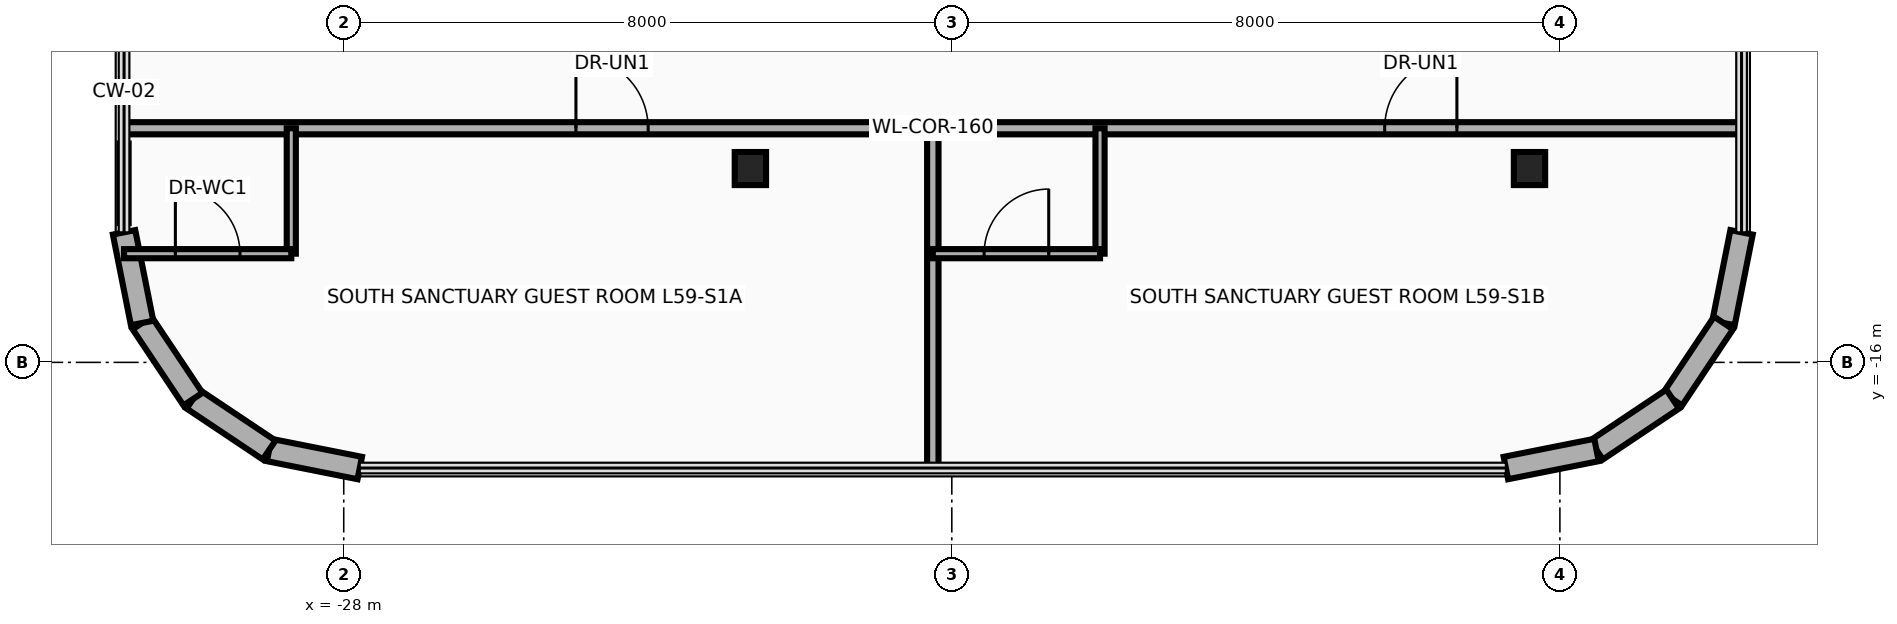
"""IFC4 building model, lengths in metres.
Left out: names, types, materials, properties, quantities, classifications, styles, units other than length and angle.
Written with IfcOpenShell. Run it as: python <this file> out.ifc"""

import sys

from ifc_helpers import new_model, si_unit, direction, frame, frame_2d, origin, origin_2d, place, context, subcontext, project, spatial, rectangle, i_section, extrude, source, transform, mapped, element, fill, save


model = new_model("IFC4")
c1 = context("Model", 3, precision=1e-05, world=origin(), true_north=direction((0.0, 1.0)))
c2 = subcontext(c1, "Body", "Model", "MODEL_VIEW")
j1 = project(units=[si_unit("LENGTHUNIT", "METRE"), si_unit("PLANEANGLEUNIT", "RADIAN")], contexts=[c1])
p1 = place(None, origin())
s1 = spatial("IfcSite", under=j1, at=p1, CompositionType="ELEMENT")
p2 = place(p1, origin())
s2 = spatial("IfcBuilding", under=s1, at=p2, CompositionType="ELEMENT")
p3 = place(p2, frame((0.0, 0.0, 230.0)))
s3 = spatial("IfcBuildingStorey", under=s2, at=p3, CompositionType="ELEMENT", Elevation=230.0)
m1 = source(origin(), c2, "Body", "SweptSolid", [
    extrude(i_section(OverallWidth=0.412, OverallDepth=0.435, WebThickness=0.036, FlangeThickness=0.057, at=origin_2d()), origin(), (0.0, 0.0, 1.0), 3.5),
])
for number, where, z_axis, x_axis in (
    (1, (-22.65, -13.45, 0.0), (0.0, 0.0, 1.0), (1.0, 0.0, 0.0)),
    (2, (-12.4, -13.45, 0.0), (0.0, 0.0, 1.0), (1.0, 0.0, 0.0)),
):
    element("IfcColumn", number, at=place(p3, frame(where, z_axis=z_axis, x_axis=x_axis)), inside=s3, PredefinedType="COLUMN", context=c2, shape_type="MappedRepresentation", body=[
        mapped(m1, transform((0.0, 0.0, 0.0), x_axis=(1.0, 0.0, 0.0), y_axis=(0.0, 1.0, 0.0), z_axis=(0.0, 0.0, 1.0), scale=1.0)),
    ])
p4 = place(p3, frame((-9.61, -14.289, 0.0), z_axis=(0.0, 0.0, 1.0), x_axis=(-0.194996050505, -0.980804027463, 0.0)))
e3 = element("IfcWall", 3, at=p4, inside=s3, PredefinedType="SOLIDWALL", context=c2, shape_type="SweptSolid", body=[
    extrude(rectangle(XDim=1.216, YDim=0.3, at=frame_2d((0.608, 0.0))), origin(), (0.0, 0.0, 1.0), 3.26),
])
for number, where, z_axis, x_axis in (
    (4, (-9.847, -15.482, 0.0), (0.0, 0.0, 1.0), (-0.556, -0.831, 0.0)),
    (5, (-10.517, -16.483, 0.0), (0.0, 0.0, 1.0), (-0.831, -0.556, 0.0)),
):
    element("IfcWall", number, at=place(p3, frame(where, z_axis=z_axis, x_axis=x_axis)), inside=s3, PredefinedType="SOLIDWALL", context=c2, shape_type="SweptSolid", body=[
        extrude(rectangle(XDim=1.205, YDim=0.3, at=frame_2d((0.603, 0.0))), origin(), (0.0, 0.0, 1.0), 3.26),
    ])
for number, where, z_axis, x_axis in (
    (6, (-11.518, -17.153, 0.0), (0.0, 0.0, 1.0), (-0.981, -0.195, 0.0)),
    (7, (-27.789, -17.39, 0.0), (0.0, 0.0, 1.0), (-0.981, 0.195, 0.0)),
):
    element("IfcWall", number, at=place(p3, frame(where, z_axis=z_axis, x_axis=x_axis)), inside=s3, PredefinedType="SOLIDWALL", context=c2, shape_type="SweptSolid", body=[
        extrude(rectangle(XDim=1.216, YDim=0.3, at=frame_2d((0.608, 0.0))), origin(), (0.0, 0.0, 1.0), 3.26),
    ])
for number, where, z_axis, x_axis in (
    (8, (-28.982, -17.153, 0.0), (0.0, 0.0, 1.0), (-0.831, 0.556, 0.0)),
    (9, (-29.983, -16.483, 0.0), (0.0, 0.0, 1.0), (-0.556, 0.831, 0.0)),
):
    element("IfcWall", number, at=place(p3, frame(where, z_axis=z_axis, x_axis=x_axis)), inside=s3, PredefinedType="SOLIDWALL", context=c2, shape_type="SweptSolid", body=[
        extrude(rectangle(XDim=1.205, YDim=0.3, at=frame_2d((0.603, 0.0))), origin(), (0.0, 0.0, 1.0), 3.26),
    ])
p5 = place(p3, frame((-30.653, -15.482, 0.0), z_axis=(0.0, 0.0, 1.0), x_axis=(-0.194996050505, 0.980804027463, 0.0)))
e10 = element("IfcWall", 10, at=p5, inside=s3, PredefinedType="SOLIDWALL", context=c2, shape_type="SweptSolid", body=[
    extrude(rectangle(XDim=1.216, YDim=0.3, at=frame_2d((0.608, 0.0))), origin(), (0.0, 0.0, 1.0), 3.26),
])
p6 = place(p3, frame((-30.89, -12.92, 0.0), z_axis=(0.0, 0.0, 1.0), x_axis=(1.0, 0.0, 0.0)))
e11 = element("IfcWall", 11, at=p6, inside=s3, PredefinedType="PARTITIONING", context=c2, shape_type="SweptSolid", body=[
    extrude(rectangle(XDim=21.28, YDim=0.16, at=frame_2d((10.64, 0.0))), origin(), (0.0, 0.0, 1.0), 2.634),
])
p7 = place(p6, frame((5.945, 0.0, 0.0)))
e12 = element("IfcOpeningElement", 12, at=p7, cuts=e11, PredefinedType="OPENING", context=c2, shape_type="SweptSolid", body=[
    extrude(rectangle(XDim=0.95, YDim=2.15, at=frame_2d((0.475, 1.075))), frame((0.0, 0.095, 0.0), z_axis=(0.0, -1.0, 0.0), x_axis=(1.0, 0.0, 0.0)), (0.0, 0.0, 1.0), 0.19),
])
p8 = place(p6, frame((16.585, 0.0, 0.0)))
e13 = element("IfcOpeningElement", 13, at=p8, cuts=e11, PredefinedType="OPENING", context=c2, shape_type="SweptSolid", body=[
    extrude(rectangle(XDim=0.95, YDim=2.15, at=frame_2d((0.475, 1.075))), frame((0.0, 0.095, 0.0), z_axis=(0.0, -1.0, 0.0), x_axis=(1.0, 0.0, 0.0)), (0.0, 0.0, 1.0), 0.19),
])
p9 = place(p3, frame((-20.25, -17.39, 0.0), z_axis=(0.0, 0.0, 1.0), x_axis=(0.0, 1.0, 0.0)))
e14 = element("IfcWall", 14, at=p9, inside=s3, PredefinedType="PARTITIONING", context=c2, shape_type="SweptSolid", body=[
    extrude(rectangle(XDim=4.47, YDim=0.15, at=frame_2d((2.235, 0.0))), origin(), (0.0, 0.0, 1.0), 2.706),
])
p10 = place(p3, frame((-28.69, -14.57, 0.0), z_axis=(0.0, 0.0, 1.0), x_axis=(0.0, 1.0, 0.0)))
e15 = element("IfcWall", 15, at=p10, inside=s3, PredefinedType="PARTITIONING", context=c2, shape_type="SweptSolid", body=[
    extrude(rectangle(XDim=1.65, YDim=0.12, at=frame_2d((0.825, 0.0))), origin(), (0.0, 0.0, 1.0), 3.26),
])
p11 = place(p3, frame((-30.89, -14.57, 0.0), z_axis=(0.0, 0.0, 1.0), x_axis=(1.0, 0.0, 0.0)))
e16 = element("IfcWall", 16, at=p11, inside=s3, PredefinedType="PARTITIONING", context=c2, shape_type="SweptSolid", body=[
    extrude(rectangle(XDim=2.2, YDim=0.12, at=frame_2d((1.1, 0.0))), origin(), (0.0, 0.0, 1.0), 3.26),
])
p12 = place(p11, frame((0.675, 0.0, 0.0)))
e17 = element("IfcOpeningElement", 17, at=p12, cuts=e16, PredefinedType="OPENING", context=c2, shape_type="SweptSolid", body=[
    extrude(rectangle(XDim=0.85, YDim=2.1, at=frame_2d((0.425, 1.05))), frame((0.0, 0.075, 0.0), z_axis=(0.0, -1.0, 0.0), x_axis=(1.0, 0.0, 0.0)), (0.0, 0.0, 1.0), 0.15),
])
p13 = place(p3, frame((-30.89, -14.167, 0.0), z_axis=(0.0, 0.0, 1.0), x_axis=(0.0, 1.0, 0.0)))
e18 = element("IfcWall", 18, at=p13, inside=s3, PredefinedType="PARTITIONING", context=c2, shape_type="SweptSolid", body=[
    extrude(rectangle(XDim=1.047, YDim=0.12, at=frame_2d((0.523, 0.0))), origin(), (0.0, 0.0, 1.0), 3.26),
])
p14 = place(p3, frame((-18.05, -14.57, 0.0), z_axis=(0.0, 0.0, 1.0), x_axis=(0.0, 1.0, 0.0)))
e19 = element("IfcWall", 19, at=p14, inside=s3, PredefinedType="PARTITIONING", context=c2, shape_type="SweptSolid", body=[
    extrude(rectangle(XDim=1.65, YDim=0.12, at=frame_2d((0.825, 0.0))), origin(), (0.0, 0.0, 1.0), 2.706),
])
p15 = place(p3, frame((-20.25, -14.57, 0.0), z_axis=(0.0, 0.0, 1.0), x_axis=(1.0, 0.0, 0.0)))
e20 = element("IfcWall", 20, at=p15, inside=s3, PredefinedType="PARTITIONING", context=c2, shape_type="SweptSolid", body=[
    extrude(rectangle(XDim=2.2, YDim=0.12, at=frame_2d((1.1, 0.0))), origin(), (0.0, 0.0, 1.0), 3.26),
])
p16 = place(p15, frame((0.675, 0.0, 0.0)))
e21 = element("IfcOpeningElement", 21, at=p16, cuts=e20, PredefinedType="OPENING", context=c2, shape_type="SweptSolid", body=[
    extrude(rectangle(XDim=0.85, YDim=2.1, at=frame_2d((0.425, 1.05))), frame((0.0, 0.075, 0.0), z_axis=(0.0, -1.0, 0.0), x_axis=(1.0, 0.0, 0.0)), (0.0, 0.0, 1.0), 0.15),
])
p17 = place(p7, origin())
e22 = element("IfcDoor", 22, at=p17, inside=s3, OperationType="SINGLE_SWING_RIGHT", PredefinedType="DOOR", context=c2, shape_type="SweptSolid", body=[
    extrude(rectangle(XDim=0.95, YDim=2.15, at=frame_2d((0.475, 1.075))), frame((0.0, 0.025, 0.0), z_axis=(0.0, -1.0, 0.0), x_axis=(1.0, 0.0, 0.0)), (0.0, 0.0, 1.0), 0.05),
])
fill(e12, e22)
p18 = place(p12, origin())
e23 = element("IfcDoor", 23, at=p18, inside=s3, OperationType="SINGLE_SWING_LEFT", PredefinedType="DOOR", context=c2, shape_type="SweptSolid", body=[
    extrude(rectangle(XDim=0.85, YDim=2.1, at=frame_2d((0.425, 1.05))), frame((0.0, 0.025, 0.0), z_axis=(0.0, -1.0, 0.0), x_axis=(1.0, 0.0, 0.0)), (0.0, 0.0, 1.0), 0.05),
])
fill(e17, e23)
p19 = place(p8, origin())
e24 = element("IfcDoor", 24, at=p19, inside=s3, OperationType="SINGLE_SWING_RIGHT", PredefinedType="DOOR", context=c2, shape_type="SweptSolid", body=[
    extrude(rectangle(XDim=0.95, YDim=2.15, at=frame_2d((0.475, 1.075))), frame((0.0, 0.025, 0.0), z_axis=(0.0, -1.0, 0.0), x_axis=(1.0, 0.0, 0.0)), (0.0, 0.0, 1.0), 0.05),
])
fill(e13, e24)
p20 = place(p16, origin())
e25 = element("IfcDoor", 25, at=p20, inside=s3, OperationType="SINGLE_SWING_LEFT", PredefinedType="DOOR", context=c2, shape_type="SweptSolid", body=[
    extrude(rectangle(XDim=0.85, YDim=2.1, at=frame_2d((0.425, 1.05))), frame((0.0, 0.025, 0.0), z_axis=(0.0, -1.0, 0.0), x_axis=(1.0, 0.0, 0.0)), (0.0, 0.0, 1.0), 0.05),
])
fill(e21, e25)
save(model, sys.argv[1])
